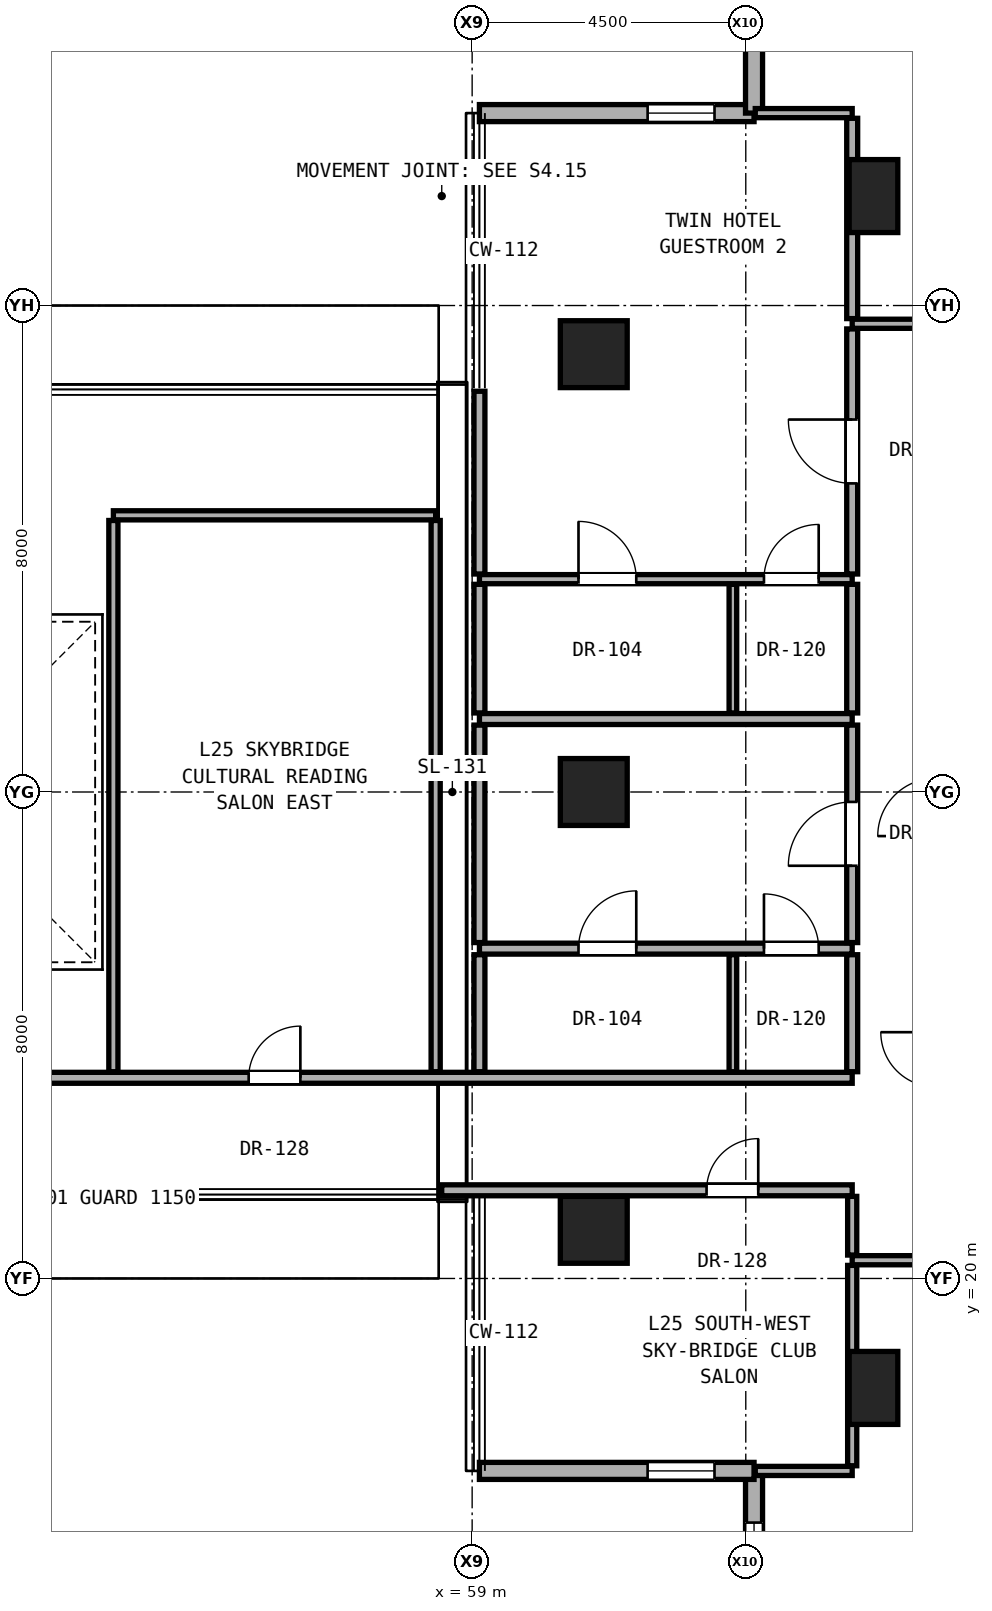
"""IFC4 building model, lengths in metres.
Left out: names, types, materials, properties, quantities, classifications, styles, units other than length and angle.
Written with IfcOpenShell. Run it as: python <this file> out.ifc"""

import sys

from ifc_helpers import new_model, si_unit, direction, frame, frame_2d, origin, origin_2d, place, context, subcontext, project, spatial, rectangle, hollow_rectangle, extrude, element, fill, save


model = new_model("IFC4")
c1 = context("Model", 3, precision=1e-05, world=origin(), true_north=direction((0.0, 1.0)))
c2 = subcontext(c1, "Body", "Model", "MODEL_VIEW")
j1 = project(units=[si_unit("LENGTHUNIT", "METRE"), si_unit("PLANEANGLEUNIT", "RADIAN")], contexts=[c1])
p1 = place(None, origin())
s1 = spatial("IfcSite", under=j1, at=p1, CompositionType="ELEMENT")
p2 = place(p1, origin())
s2 = spatial("IfcBuilding", under=s1, at=p2, CompositionType="ELEMENT")
p3 = place(p2, frame((0.0, 0.0, 91.7)))
s3 = spatial("IfcBuildingStorey", under=s2, at=p3, CompositionType="ELEMENT", Elevation=91.7)
for number, where, z_axis, x_axis in (
    (1, (61.0, 20.8, 0.0), (0.0, 0.0, 1.0), (1.0, 0.0, 0.0)),
    (2, (61.0, 28.0, 0.0), (0.0, 0.0, 1.0), (1.0, 0.0, 0.0)),
    (3, (61.0, 35.2, 0.0), (0.0, 0.0, 1.0), (1.0, 0.0, 0.0)),
):
    element("IfcColumn", number, at=place(p3, frame(where, z_axis=z_axis, x_axis=x_axis)), inside=s3, PredefinedType="COLUMN", context=c2, shape_type="SweptSolid", body=[
        extrude(hollow_rectangle(XDim=1.1, YDim=1.1, WallThickness=0.06, at=origin_2d()), origin(), (0.0, 0.0, 1.0), 3.3),
    ])
for number, where, z_axis, x_axis in (
    (4, (65.6, 18.2, 0.0), (0.0, 0.0, 1.0), (1.0, 0.0, 0.0)),
    (5, (65.6, 37.8, 0.0), (0.0, 0.0, 1.0), (1.0, 0.0, 0.0)),
):
    element("IfcColumn", number, at=place(p3, frame(where, z_axis=z_axis, x_axis=x_axis)), inside=s3, PredefinedType="PILASTER", context=c2, shape_type="SweptSolid", body=[
        extrude(rectangle(XDim=0.8, YDim=1.2, at=origin_2d()), origin(), (0.0, 0.0, 1.0), 3.3),
    ])
p4 = place(p3, frame((63.636, 16.835, 0.0), z_axis=(0.0, 0.0, 1.0), x_axis=(0.0, -1.0, 0.0)))
e6 = element("IfcWall", 6, at=p4, inside=s3, PredefinedType="SOLIDWALL", context=c2, shape_type="SweptSolid", body=[
    extrude(rectangle(XDim=4.516, YDim=0.28, at=frame_2d((2.258, 0.0))), origin(), (0.0, 0.0, 1.0), 3.06),
])
p5 = place(p4, frame((0.85, 0.0, 0.81)))
e7 = element("IfcOpeningElement", 7, at=p5, cuts=e6, PredefinedType="OPENING", context=c2, shape_type="SweptSolid", body=[
    extrude(rectangle(XDim=1.5, YDim=2.1, at=frame_2d((0.75, 1.05))), frame((0.0, 0.15, 0.0), z_axis=(0.0, -1.0, 0.0), x_axis=(1.0, 0.0, 0.0)), (0.0, 0.0, 1.0), 0.3),
])
p6 = place(p3, frame((59.119, 16.835, 0.0), z_axis=(0.0, 0.0, 1.0), x_axis=(1.0, 0.0, 0.0)))
e8 = element("IfcWall", 8, at=p6, inside=s3, PredefinedType="SOLIDWALL", context=c2, shape_type="SweptSolid", body=[
    extrude(rectangle(XDim=4.516, YDim=0.28, at=frame_2d((2.258, 0.0))), origin(), (0.0, 0.0, 1.0), 3.06),
])
p7 = place(p6, frame((2.766, 0.0, 0.85)))
e9 = element("IfcOpeningElement", 9, at=p7, cuts=e8, PredefinedType="OPENING", context=c2, shape_type="SweptSolid", body=[
    extrude(rectangle(XDim=1.1, YDim=2.0, at=frame_2d((0.55, 1.0))), frame((0.0, 0.15, 0.0), z_axis=(0.0, -1.0, 0.0), x_axis=(1.0, 0.0, 0.0)), (0.0, 0.0, 1.0), 0.3),
])
p8 = place(p3, frame((63.636, 39.165, 0.0), z_axis=(0.0, 0.0, 1.0), x_axis=(-1.0, 0.0, 0.0)))
e10 = element("IfcWall", 10, at=p8, inside=s3, PredefinedType="SOLIDWALL", context=c2, shape_type="SweptSolid", body=[
    extrude(rectangle(XDim=4.516, YDim=0.28, at=frame_2d((2.258, 0.0))), origin(), (0.0, 0.0, 1.0), 3.06),
])
p9 = place(p8, frame((0.65, 0.0, 0.85)))
e11 = element("IfcOpeningElement", 11, at=p9, cuts=e10, PredefinedType="OPENING", context=c2, shape_type="SweptSolid", body=[
    extrude(rectangle(XDim=1.1, YDim=2.0, at=frame_2d((0.55, 1.0))), frame((0.0, 0.15, 0.0), z_axis=(0.0, -1.0, 0.0), x_axis=(1.0, 0.0, 0.0)), (0.0, 0.0, 1.0), 0.3),
])
p10 = place(p3, frame((63.636, 43.681, 0.0), z_axis=(0.0, 0.0, 1.0), x_axis=(0.0, -1.0, 0.0)))
e12 = element("IfcWall", 12, at=p10, inside=s3, PredefinedType="SOLIDWALL", context=c2, shape_type="SweptSolid", body=[
    extrude(rectangle(XDim=4.516, YDim=0.28, at=frame_2d((2.258, 0.0))), origin(), (0.0, 0.0, 1.0), 3.06),
])
p11 = place(p3, frame((63.656, 16.835, 0.0), z_axis=(0.0, 0.0, 1.0), x_axis=(1.0, 0.0, 0.0)))
e13 = element("IfcWall", 13, at=p11, inside=s3, PredefinedType="PARTITIONING", context=c2, shape_type="SweptSolid", body=[
    extrude(rectangle(XDim=1.594, YDim=0.15, at=frame_2d((0.797, 0.0))), origin(), (0.0, 0.0, 1.0), 3.08),
])
p12 = place(p3, frame((65.25, 20.3, 0.0), z_axis=(0.0, 0.0, 1.0), x_axis=(1.0, 0.0, 0.0)))
e14 = element("IfcWall", 14, at=p12, inside=s3, PredefinedType="PARTITIONING", context=c2, shape_type="SweptSolid", body=[
    extrude(rectangle(XDim=1.37, YDim=0.15, at=frame_2d((0.685, 0.0))), origin(), (0.0, 0.0, 1.0), 3.08),
])
p13 = place(p3, frame((58.5, 21.45, 0.0), z_axis=(0.0, 0.0, 1.0), x_axis=(1.0, 0.0, 0.0)))
e15 = element("IfcWall", 15, at=p13, inside=s3, PredefinedType="PARTITIONING", context=c2, shape_type="SweptSolid", body=[
    extrude(rectangle(XDim=6.75, YDim=0.18, at=frame_2d((3.375, 0.0))), origin(), (0.0, 0.0, 1.0), 2.085),
])
p14 = place(p13, frame((4.355, 0.0, 0.0)))
e16 = element("IfcOpeningElement", 16, at=p14, cuts=e15, PredefinedType="OPENING", context=c2, shape_type="SweptSolid", body=[
    extrude(rectangle(XDim=0.85, YDim=2.01, at=frame_2d((0.425, 1.005))), frame((0.0, 0.1, 0.0), z_axis=(0.0, -1.0, 0.0), x_axis=(1.0, 0.0, 0.0)), (0.0, 0.0, 1.0), 0.2),
])
p15 = place(p3, frame((32.14, 23.3, 0.0), z_axis=(0.0, 0.0, 1.0), x_axis=(1.0, 0.0, 0.0)))
e17 = element("IfcWall", 17, at=p15, inside=s3, PredefinedType="PARTITIONING", context=c2, shape_type="SweptSolid", body=[
    extrude(rectangle(XDim=33.11, YDim=0.18, at=frame_2d((16.555, 0.0))), origin(), (0.0, 0.0, 1.0), 2.145),
])
p16 = place(p15, frame((11.525, 0.0, 0.0)))
e18 = element("IfcOpeningElement", 18, at=p16, cuts=e17, PredefinedType="OPENING", context=c2, shape_type="SweptSolid", body=[
    extrude(rectangle(XDim=0.85, YDim=2.01, at=frame_2d((0.425, 1.005))), frame((0.0, 0.1, 0.0), z_axis=(0.0, -1.0, 0.0), x_axis=(1.0, 0.0, 0.0)), (0.0, 0.0, 1.0), 0.2),
])
p17 = place(p15, frame((23.185, 0.0, 0.0)))
e19 = element("IfcOpeningElement", 19, at=p17, cuts=e17, PredefinedType="OPENING", context=c2, shape_type="SweptSolid", body=[
    extrude(rectangle(XDim=0.85, YDim=2.01, at=frame_2d((0.425, 1.005))), frame((0.0, 0.1, 0.0), z_axis=(0.0, -1.0, 0.0), x_axis=(1.0, 0.0, 0.0)), (0.0, 0.0, 1.0), 0.2),
])
p18 = place(p3, frame((59.12, 25.424, 0.0), z_axis=(0.0, 0.0, 1.0), x_axis=(1.0, 0.0, 0.0)))
e20 = element("IfcWall", 20, at=p18, inside=s3, PredefinedType="PARTITIONING", context=c2, shape_type="SweptSolid", body=[
    extrude(rectangle(XDim=6.13, YDim=0.18, at=frame_2d((3.065, 0.0))), origin(), (0.0, 0.0, 1.0), 2.216),
])
p19 = place(p18, frame((1.629, 0.0, 0.0)))
e21 = element("IfcOpeningElement", 21, at=p19, cuts=e20, PredefinedType="OPENING", context=c2, shape_type="SweptSolid", body=[
    extrude(rectangle(XDim=0.95, YDim=2.15, at=frame_2d((0.475, 1.075))), frame((0.0, 0.1, 0.0), z_axis=(0.0, -1.0, 0.0), x_axis=(1.0, 0.0, 0.0)), (0.0, 0.0, 1.0), 0.2),
])
p20 = place(p18, frame((4.679, 0.0, 0.0)))
e22 = element("IfcOpeningElement", 22, at=p20, cuts=e20, PredefinedType="OPENING", context=c2, shape_type="SweptSolid", body=[
    extrude(rectangle(XDim=0.9, YDim=2.1, at=frame_2d((0.45, 1.05))), frame((0.0, 0.1, 0.0), z_axis=(0.0, -1.0, 0.0), x_axis=(1.0, 0.0, 0.0)), (0.0, 0.0, 1.0), 0.2),
])
p21 = place(p3, frame((59.12, 29.2, 0.0), z_axis=(0.0, 0.0, 1.0), x_axis=(1.0, 0.0, 0.0)))
e23 = element("IfcWall", 23, at=p21, inside=s3, PredefinedType="PARTITIONING", context=c2, shape_type="SweptSolid", body=[
    extrude(rectangle(XDim=6.13, YDim=0.18, at=frame_2d((3.065, 0.0))), origin(), (0.0, 0.0, 1.0), 2.216),
])
p22 = place(p3, frame((59.12, 31.5, 0.0), z_axis=(0.0, 0.0, 1.0), x_axis=(1.0, 0.0, 0.0)))
e24 = element("IfcWall", 24, at=p22, inside=s3, PredefinedType="PARTITIONING", context=c2, shape_type="SweptSolid", body=[
    extrude(rectangle(XDim=6.13, YDim=0.15, at=frame_2d((3.065, 0.0))), origin(), (0.0, 0.0, 1.0), 2.216),
])
p23 = place(p22, frame((1.629, 0.0, 0.0)))
e25 = element("IfcOpeningElement", 25, at=p23, cuts=e24, PredefinedType="OPENING", context=c2, shape_type="SweptSolid", body=[
    extrude(rectangle(XDim=0.95, YDim=2.15, at=frame_2d((0.475, 1.075))), frame((0.0, 0.085, 0.0), z_axis=(0.0, -1.0, 0.0), x_axis=(1.0, 0.0, 0.0)), (0.0, 0.0, 1.0), 0.17),
])
p24 = place(p22, frame((4.679, 0.0, 0.0)))
e26 = element("IfcOpeningElement", 26, at=p24, cuts=e24, PredefinedType="OPENING", context=c2, shape_type="SweptSolid", body=[
    extrude(rectangle(XDim=0.9, YDim=2.1, at=frame_2d((0.45, 1.05))), frame((0.0, 0.085, 0.0), z_axis=(0.0, -1.0, 0.0), x_axis=(1.0, 0.0, 0.0)), (0.0, 0.0, 1.0), 0.17),
])
p25 = place(p3, frame((53.1, 32.55, 0.0), z_axis=(0.0, 0.0, 1.0), x_axis=(1.0, 0.0, 0.0)))
e27 = element("IfcWall", 27, at=p25, inside=s3, PredefinedType="PARTITIONING", context=c2, shape_type="SweptSolid", body=[
    extrude(rectangle(XDim=5.3, YDim=0.15, at=frame_2d((2.65, 0.0))), origin(), (0.0, 0.0, 1.0), 2.316),
])
p26 = place(p3, frame((65.25, 35.7, 0.0), z_axis=(0.0, 0.0, 1.0), x_axis=(1.0, 0.0, 0.0)))
e28 = element("IfcWall", 28, at=p26, inside=s3, PredefinedType="PARTITIONING", context=c2, shape_type="SweptSolid", body=[
    extrude(rectangle(XDim=1.37, YDim=0.15, at=frame_2d((0.685, 0.0))), origin(), (0.0, 0.0, 1.0), 3.08),
])
p27 = place(p3, frame((63.656, 39.164, 0.0), z_axis=(0.0, 0.0, 1.0), x_axis=(1.0, 0.0, 0.0)))
e29 = element("IfcWall", 29, at=p27, inside=s3, PredefinedType="PARTITIONING", context=c2, shape_type="SweptSolid", body=[
    extrude(rectangle(XDim=1.594, YDim=0.15, at=frame_2d((0.797, 0.0))), origin(), (0.0, 0.0, 1.0), 3.08),
])
for number, where, z_axis, x_axis in (
    (30, (53.1, 23.4, 0.0), (0.0, 0.0, 1.0), (0.0, 1.0, 0.0)),
    (31, (58.4, 23.4, 0.0), (0.0, 0.0, 1.0), (0.0, 1.0, 0.0)),
):
    element("IfcWall", number, at=place(p3, frame(where, z_axis=z_axis, x_axis=x_axis)), inside=s3, PredefinedType="PARTITIONING", context=c2, shape_type="SweptSolid", body=[
        extrude(rectangle(XDim=9.065, YDim=0.15, at=frame_2d((4.533, 0.0))), origin(), (0.0, 0.0, 1.0), 2.085),
    ])
p28 = place(p3, frame((59.12, 23.4, 0.0), z_axis=(0.0, 0.0, 1.0), x_axis=(0.0, 1.0, 0.0)))
e32 = element("IfcWall", 32, at=p28, inside=s3, PredefinedType="PARTITIONING", context=c2, shape_type="SweptSolid", body=[
    extrude(rectangle(XDim=1.924, YDim=0.18, at=frame_2d((0.962, 0.0))), origin(), (0.0, 0.0, 1.0), 3.08),
])
p29 = place(p3, frame((59.12, 25.524, 0.0), z_axis=(0.0, 0.0, 1.0), x_axis=(0.0, 1.0, 0.0)))
e33 = element("IfcWall", 33, at=p29, inside=s3, PredefinedType="PARTITIONING", context=c2, shape_type="SweptSolid", body=[
    extrude(rectangle(XDim=3.576, YDim=0.18, at=frame_2d((1.788, 0.0))), origin(), (0.0, 0.0, 1.0), 2.085),
])
p30 = place(p3, frame((59.12, 29.3, 0.0), z_axis=(0.0, 0.0, 1.0), x_axis=(0.0, 1.0, 0.0)))
e34 = element("IfcWall", 34, at=p30, inside=s3, PredefinedType="PARTITIONING", context=c2, shape_type="SweptSolid", body=[
    extrude(rectangle(XDim=2.115, YDim=0.18, at=frame_2d((1.058, 0.0))), origin(), (0.0, 0.0, 1.0), 3.08),
])
p31 = place(p3, frame((59.12, 31.585, 0.0), z_axis=(0.0, 0.0, 1.0), x_axis=(0.0, 1.0, 0.0)))
e35 = element("IfcWall", 35, at=p31, inside=s3, PredefinedType="PARTITIONING", context=c2, shape_type="SweptSolid", body=[
    extrude(rectangle(XDim=3.005, YDim=0.18, at=frame_2d((1.502, 0.0))), origin(), (0.0, 0.0, 1.0), 2.085),
])
p32 = place(p3, frame((63.288, 23.4, 0.0), z_axis=(0.0, 0.0, 1.0), x_axis=(0.0, 1.0, 0.0)))
e36 = element("IfcWall", 36, at=p32, inside=s3, PredefinedType="PARTITIONING", context=c2, shape_type="SweptSolid", body=[
    extrude(rectangle(XDim=1.924, YDim=0.125, at=frame_2d((0.962, 0.0))), origin(), (0.0, 0.0, 1.0), 3.08),
])
p33 = place(p3, frame((63.288, 29.3, 0.0), z_axis=(0.0, 0.0, 1.0), x_axis=(0.0, 1.0, 0.0)))
e37 = element("IfcWall", 37, at=p33, inside=s3, PredefinedType="PARTITIONING", context=c2, shape_type="SweptSolid", body=[
    extrude(rectangle(XDim=2.115, YDim=0.125, at=frame_2d((1.058, 0.0))), origin(), (0.0, 0.0, 1.0), 3.08),
])
p34 = place(p3, frame((65.25, 16.92, 0.0), z_axis=(0.0, 0.0, 1.0), x_axis=(0.0, 1.0, 0.0)))
e38 = element("IfcWall", 38, at=p34, inside=s3, PredefinedType="PARTITIONING", context=c2, shape_type="SweptSolid", body=[
    extrude(rectangle(XDim=3.295, YDim=0.15, at=frame_2d((1.647, 0.0))), origin(), (0.0, 0.0, 1.0), 2.456),
])
p35 = place(p3, frame((65.25, 20.385, 0.0), z_axis=(0.0, 0.0, 1.0), x_axis=(0.0, 1.0, 0.0)))
e39 = element("IfcWall", 39, at=p35, inside=s3, PredefinedType="PARTITIONING", context=c2, shape_type="SweptSolid", body=[
    extrude(rectangle(XDim=0.965, YDim=0.15, at=frame_2d((0.482, 0.0))), origin(), (0.0, 0.0, 1.0), 2.472),
])
p36 = place(p3, frame((65.25, 23.4, 0.0), z_axis=(0.0, 0.0, 1.0), x_axis=(0.0, 1.0, 0.0)))
e40 = element("IfcWall", 40, at=p36, inside=s3, PredefinedType="PARTITIONING", context=c2, shape_type="SweptSolid", body=[
    extrude(rectangle(XDim=1.924, YDim=0.18, at=frame_2d((0.962, 0.0))), origin(), (0.0, 0.0, 1.0), 3.08),
])
p37 = place(p3, frame((65.25, 25.524, 0.0), z_axis=(0.0, 0.0, 1.0), x_axis=(0.0, 1.0, 0.0)))
e41 = element("IfcWall", 41, at=p37, inside=s3, PredefinedType="PARTITIONING", context=c2, shape_type="SweptSolid", body=[
    extrude(rectangle(XDim=3.576, YDim=0.18, at=frame_2d((1.788, 0.0))), origin(), (0.0, 0.0, 1.0), 2.299),
])
p38 = place(p37, frame((1.263, 0.0, 0.0)))
e42 = element("IfcOpeningElement", 42, at=p38, cuts=e41, PredefinedType="OPENING", context=c2, shape_type="SweptSolid", body=[
    extrude(rectangle(XDim=1.05, YDim=2.2, at=frame_2d((0.525, 1.1))), frame((0.0, 0.1, 0.0), z_axis=(0.0, -1.0, 0.0), x_axis=(1.0, 0.0, 0.0)), (0.0, 0.0, 1.0), 0.2),
])
p39 = place(p3, frame((65.25, 29.3, 0.0), z_axis=(0.0, 0.0, 1.0), x_axis=(0.0, 1.0, 0.0)))
e43 = element("IfcWall", 43, at=p39, inside=s3, PredefinedType="PARTITIONING", context=c2, shape_type="SweptSolid", body=[
    extrude(rectangle(XDim=2.115, YDim=0.18, at=frame_2d((1.058, 0.0))), origin(), (0.0, 0.0, 1.0), 3.08),
])
p40 = place(p3, frame((65.25, 31.585, 0.0), z_axis=(0.0, 0.0, 1.0), x_axis=(0.0, 1.0, 0.0)))
e44 = element("IfcWall", 44, at=p40, inside=s3, PredefinedType="PARTITIONING", context=c2, shape_type="SweptSolid", body=[
    extrude(rectangle(XDim=4.03, YDim=0.18, at=frame_2d((2.015, 0.0))), origin(), (0.0, 0.0, 1.0), 2.472),
])
p41 = place(p40, frame((1.49, 0.0, 0.0)))
e45 = element("IfcOpeningElement", 45, at=p41, cuts=e44, PredefinedType="OPENING", context=c2, shape_type="SweptSolid", body=[
    extrude(rectangle(XDim=1.05, YDim=2.2, at=frame_2d((0.525, 1.1))), frame((0.0, 0.1, 0.0), z_axis=(0.0, -1.0, 0.0), x_axis=(1.0, 0.0, 0.0)), (0.0, 0.0, 1.0), 0.2),
])
p42 = place(p3, frame((65.25, 35.785, 0.0), z_axis=(0.0, 0.0, 1.0), x_axis=(0.0, 1.0, 0.0)))
e46 = element("IfcWall", 46, at=p42, inside=s3, PredefinedType="PARTITIONING", context=c2, shape_type="SweptSolid", body=[
    extrude(rectangle(XDim=3.294, YDim=0.18, at=frame_2d((1.647, 0.0))), origin(), (0.0, 0.0, 1.0), 2.456),
])
p43 = place(p5, origin())
e47 = element("IfcWindow", 47, at=p43, inside=s3, PartitioningType="SINGLE_PANEL", PredefinedType="WINDOW", context=c2, shape_type="SweptSolid", body=[
    extrude(rectangle(XDim=1.5, YDim=2.1, at=frame_2d((0.75, 1.05))), frame((0.0, 0.03, 0.0), z_axis=(0.0, -1.0, 0.0), x_axis=(1.0, 0.0, 0.0)), (0.0, 0.0, 1.0), 0.06),
])
fill(e7, e47)
p44 = place(p7, origin())
e48 = element("IfcWindow", 48, at=p44, inside=s3, PartitioningType="SINGLE_PANEL", PredefinedType="WINDOW", context=c2, shape_type="SweptSolid", body=[
    extrude(rectangle(XDim=1.1, YDim=2.0, at=frame_2d((0.55, 1.0))), frame((0.0, 0.03, 0.0), z_axis=(0.0, -1.0, 0.0), x_axis=(1.0, 0.0, 0.0)), (0.0, 0.0, 1.0), 0.06),
])
fill(e9, e48)
p45 = place(p9, origin())
e49 = element("IfcWindow", 49, at=p45, inside=s3, PartitioningType="SINGLE_PANEL", PredefinedType="WINDOW", context=c2, shape_type="SweptSolid", body=[
    extrude(rectangle(XDim=1.1, YDim=2.0, at=frame_2d((0.55, 1.0))), frame((0.0, 0.03, 0.0), z_axis=(0.0, -1.0, 0.0), x_axis=(1.0, 0.0, 0.0)), (0.0, 0.0, 1.0), 0.06),
])
fill(e11, e49)
p46 = place(p38, origin())
e50 = element("IfcDoor", 50, at=p46, inside=s3, OperationType="SINGLE_SWING_LEFT", PredefinedType="DOOR", context=c2, shape_type="SweptSolid", body=[
    extrude(rectangle(XDim=1.05, YDim=2.2, at=frame_2d((0.525, 1.1))), frame((0.0, 0.025, 0.0), z_axis=(0.0, -1.0, 0.0), x_axis=(1.0, 0.0, 0.0)), (0.0, 0.0, 1.0), 0.05),
])
fill(e42, e50)
p47 = place(p19, origin())
e51 = element("IfcDoor", 51, at=p47, inside=s3, OperationType="SINGLE_SWING_RIGHT", PredefinedType="DOOR", context=c2, shape_type="SweptSolid", body=[
    extrude(rectangle(XDim=0.95, YDim=2.15, at=frame_2d((0.475, 1.075))), frame((0.0, 0.025, 0.0), z_axis=(0.0, -1.0, 0.0), x_axis=(1.0, 0.0, 0.0)), (0.0, 0.0, 1.0), 0.05),
])
fill(e21, e51)
p48 = place(p20, origin())
e52 = element("IfcDoor", 52, at=p48, inside=s3, OperationType="SINGLE_SWING_LEFT", PredefinedType="DOOR", context=c2, shape_type="SweptSolid", body=[
    extrude(rectangle(XDim=0.9, YDim=2.1, at=frame_2d((0.45, 1.05))), frame((0.0, 0.025, 0.0), z_axis=(0.0, -1.0, 0.0), x_axis=(1.0, 0.0, 0.0)), (0.0, 0.0, 1.0), 0.05),
])
fill(e22, e52)
p49 = place(p41, origin())
e53 = element("IfcDoor", 53, at=p49, inside=s3, OperationType="SINGLE_SWING_RIGHT", PredefinedType="DOOR", context=c2, shape_type="SweptSolid", body=[
    extrude(rectangle(XDim=1.05, YDim=2.2, at=frame_2d((0.525, 1.1))), frame((0.0, 0.025, 0.0), z_axis=(0.0, -1.0, 0.0), x_axis=(1.0, 0.0, 0.0)), (0.0, 0.0, 1.0), 0.05),
])
fill(e45, e53)
p50 = place(p23, origin())
e54 = element("IfcDoor", 54, at=p50, inside=s3, OperationType="SINGLE_SWING_LEFT", PredefinedType="DOOR", context=c2, shape_type="SweptSolid", body=[
    extrude(rectangle(XDim=0.95, YDim=2.15, at=frame_2d((0.475, 1.075))), frame((0.0, 0.025, 0.0), z_axis=(0.0, -1.0, 0.0), x_axis=(1.0, 0.0, 0.0)), (0.0, 0.0, 1.0), 0.05),
])
fill(e25, e54)
p51 = place(p24, origin())
e55 = element("IfcDoor", 55, at=p51, inside=s3, OperationType="SINGLE_SWING_RIGHT", PredefinedType="DOOR", context=c2, shape_type="SweptSolid", body=[
    extrude(rectangle(XDim=0.9, YDim=2.1, at=frame_2d((0.45, 1.05))), frame((0.0, 0.025, 0.0), z_axis=(0.0, -1.0, 0.0), x_axis=(1.0, 0.0, 0.0)), (0.0, 0.0, 1.0), 0.05),
])
fill(e26, e55)
p52 = place(p14, origin())
e56 = element("IfcDoor", 56, at=p52, inside=s3, OperationType="SINGLE_SWING_RIGHT", PredefinedType="DOOR", context=c2, shape_type="SweptSolid", body=[
    extrude(rectangle(XDim=0.85, YDim=2.01, at=frame_2d((0.425, 1.005))), frame((0.0, 0.025, 0.0), z_axis=(0.0, -1.0, 0.0), x_axis=(1.0, 0.0, 0.0)), (0.0, 0.0, 1.0), 0.05),
])
fill(e16, e56)
p53 = place(p17, origin())
e57 = element("IfcDoor", 57, at=p53, inside=s3, OperationType="SINGLE_SWING_RIGHT", PredefinedType="DOOR", context=c2, shape_type="SweptSolid", body=[
    extrude(rectangle(XDim=0.85, YDim=2.01, at=frame_2d((0.425, 1.005))), frame((0.0, 0.025, 0.0), z_axis=(0.0, -1.0, 0.0), x_axis=(1.0, 0.0, 0.0)), (0.0, 0.0, 1.0), 0.05),
])
fill(e19, e57)
save(model, sys.argv[1])
